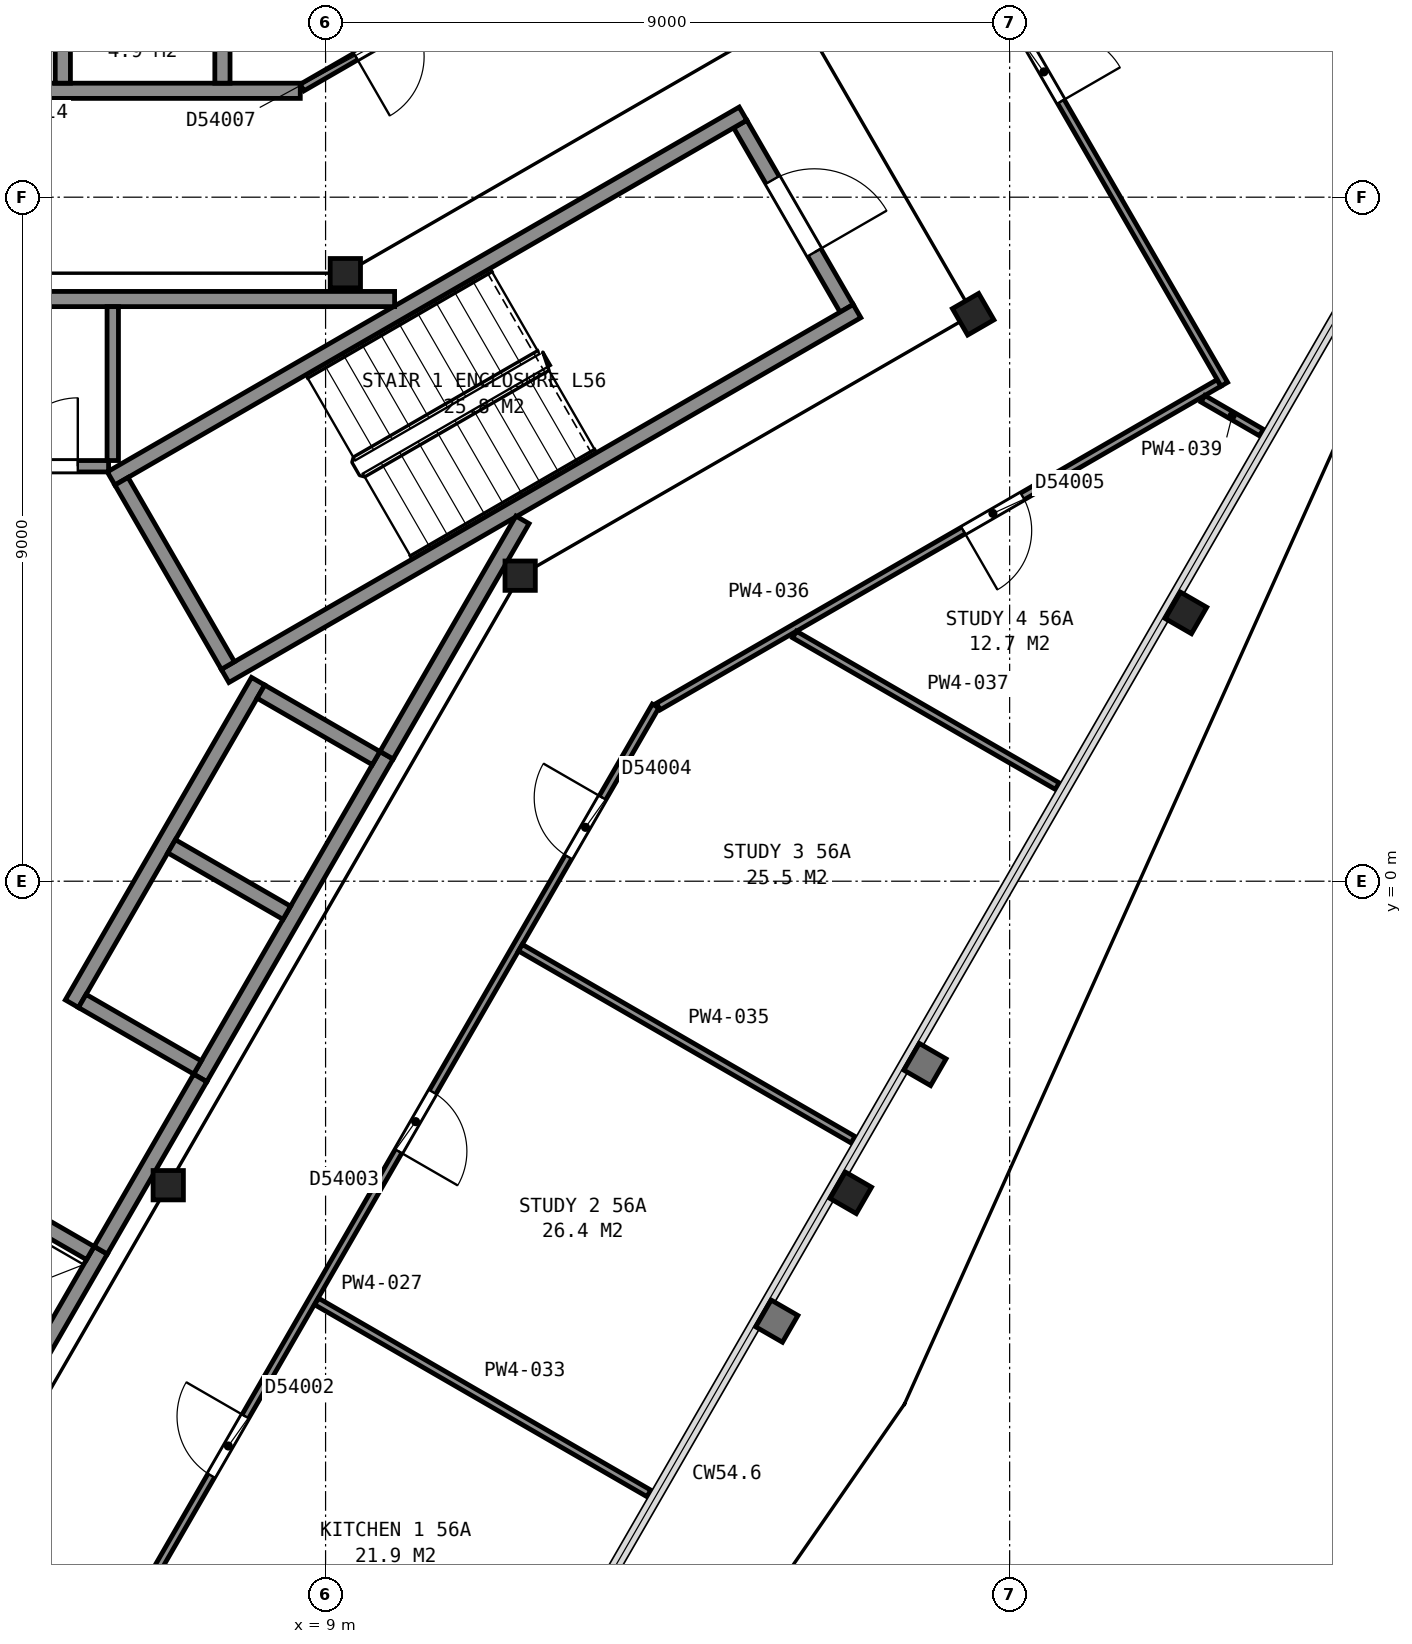
"""IFC4 building model, lengths in metres.
Left out: names, types, materials, properties, quantities, classifications, styles, units other than length and angle.
Written with IfcOpenShell. Run it as: python <this file> out.ifc"""

import sys

from ifc_helpers import new_model, si_unit, direction, frame, frame_2d, origin, origin_2d, place, context, subcontext, project, spatial, rectangle, i_section, extrude, element, fill, save


model = new_model("IFC4")
c1 = context("Model", 3, precision=1e-05, world=origin(), true_north=direction((0.0, 1.0)))
c2 = subcontext(c1, "Body", "Model", "MODEL_VIEW")
j1 = project(units=[si_unit("LENGTHUNIT", "METRE"), si_unit("PLANEANGLEUNIT", "RADIAN")], contexts=[c1])
p1 = place(None, origin())
s1 = spatial("IfcSite", under=j1, at=p1, CompositionType="ELEMENT")
p2 = place(p1, origin())
s2 = spatial("IfcBuilding", under=s1, at=p2, CompositionType="ELEMENT")
p3 = place(p2, frame((0.0, 0.0, 224.9)))
s3 = spatial("IfcBuildingStorey", under=s2, at=p3, CompositionType="ELEMENT", Elevation=224.9)
for number, where, z_axis, x_axis in (
    (1, (15.91, -4.1, 0.0), (0.0, 0.0, 1.0), (-0.5, -0.866, 0.0)),
    (2, (20.32, 3.53, 0.0), (0.0, 0.0, 1.0), (-0.5, -0.866, 0.0)),
):
    element("IfcColumn", number, at=place(p3, frame(where, z_axis=z_axis, x_axis=x_axis)), inside=s3, PredefinedType="COLUMN", context=c2, shape_type="SweptSolid", body=[
        extrude(i_section(OverallWidth=0.401, OverallDepth=0.399, WebThickness=0.025, FlangeThickness=0.04, FilletRadius=0.015, at=origin_2d()), origin(), (0.0, 0.0, 1.0), 3.7),
    ])
p4 = place(p3, frame((11.56, 4.02, 0.0), z_axis=(0.0, 0.0, 1.0), x_axis=(1.0, 0.0, 0.0)))
e3 = element("IfcColumn", 3, at=p4, inside=s3, PredefinedType="COLUMN", context=c2, shape_type="SweptSolid", body=[
    extrude(i_section(OverallWidth=0.399, OverallDepth=0.386, WebThickness=0.021, FlangeThickness=0.033, FilletRadius=0.015, at=origin_2d()), origin(), (0.0, 0.0, 1.0), 3.7),
])
p5 = place(p3, frame((17.52, 7.46, 0.0), z_axis=(0.0, 0.0, 1.0), x_axis=(0.5, -0.866025403784, 0.0)))
e4 = element("IfcColumn", 4, at=p5, inside=s3, PredefinedType="COLUMN", context=c2, shape_type="SweptSolid", body=[
    extrude(i_section(OverallWidth=0.401, OverallDepth=0.399, WebThickness=0.025, FlangeThickness=0.04, FilletRadius=0.015, at=origin_2d()), origin(), (0.0, 0.0, 1.0), 3.7),
])
for number, where, z_axis, x_axis in (
    (5, (9.26, 8.0, 0.0), (0.0, 0.0, 1.0), (1.0, 0.0, 0.0)),
    (6, (6.93, -4.0, 0.0), (0.0, 0.0, 1.0), (1.0, 0.0, 0.0)),
):
    element("IfcColumn", number, at=place(p3, frame(where, z_axis=z_axis, x_axis=x_axis)), inside=s3, PredefinedType="COLUMN", context=c2, shape_type="SweptSolid", body=[
        extrude(i_section(OverallWidth=0.399, OverallDepth=0.386, WebThickness=0.021, FlangeThickness=0.033, FilletRadius=0.015, at=origin_2d()), origin(), (0.0, 0.0, 1.0), 3.7),
    ])
p6 = place(p3, frame((15.855, 7.538, 0.0), z_axis=(0.0, 0.0, 1.0), x_axis=(-0.500049511043, 0.865996816683, 0.0)))
e7 = element("IfcWall", 7, at=p6, inside=s3, PredefinedType="PARTITIONING", context=c2, shape_type="SweptSolid", body=[
    extrude(rectangle(XDim=2.8, YDim=0.2, at=frame_2d((1.4, 0.0))), origin(), (0.0, 0.0, 1.0), 3.45),
])
p7 = place(p6, frame((0.85, 0.0, 0.0)))
e8 = element("IfcOpeningElement", 8, at=p7, cuts=e7, PredefinedType="OPENING", context=c2, shape_type="SweptSolid", body=[
    extrude(rectangle(XDim=1.1, YDim=2.1, at=frame_2d((0.55, 1.05))), frame((0.0, 0.11, 0.0), z_axis=(0.0, -1.0, 0.0), x_axis=(1.0, 0.0, 0.0)), (0.0, 0.0, 1.0), 0.22),
])
for number, where, z_axis, x_axis in (
    (9, (6.178, 5.299, 0.0), (0.0, 0.0, 1.0), (0.866, 0.5, 0.0)),
    (10, (7.678, 2.701, 0.0), (0.0, 0.0, 1.0), (0.866, 0.5, 0.0)),
):
    element("IfcWall", number, at=place(p3, frame(where, z_axis=z_axis, x_axis=x_axis)), inside=s3, PredefinedType="PARTITIONING", context=c2, shape_type="SweptSolid", body=[
        extrude(rectangle(XDim=9.6, YDim=0.2, at=frame_2d((4.8, 0.0))), origin(), (0.0, 0.0, 1.0), 3.45),
    ])
p8 = place(p3, frame((7.715, 2.838, 0.0), z_axis=(0.0, 0.0, 1.0), x_axis=(-0.500049511043, 0.865996816683, 0.0)))
e11 = element("IfcWall", 11, at=p8, inside=s3, PredefinedType="PARTITIONING", context=c2, shape_type="SweptSolid", body=[
    extrude(rectangle(XDim=2.8, YDim=0.2, at=frame_2d((1.4, 0.0))), origin(), (0.0, 0.0, 1.0), 3.45),
])
p9 = place(p3, frame((4.766, -7.065, 0.0), z_axis=(0.0, 0.0, 1.0), x_axis=(0.499948979701, 0.866054858364, 0.0)))
e12 = element("IfcWall", 12, at=p9, inside=s3, PredefinedType="PARTITIONING", context=c2, shape_type="SweptSolid", body=[
    extrude(rectangle(XDim=2.55, YDim=0.2, at=frame_2d((1.275, 0.0))), origin(), (0.0, 0.0, 1.0), 3.7),
])
p10 = place(p3, frame((7.351, -2.587, 0.0), z_axis=(0.0, 0.0, 1.0), x_axis=(0.500002801628, 0.866023786258, 0.0)))
e13 = element("IfcWall", 13, at=p10, inside=s3, PredefinedType="PARTITIONING", context=c2, shape_type="SweptSolid", body=[
    extrude(rectangle(XDim=4.9, YDim=0.2, at=frame_2d((2.45, 0.0))), origin(), (0.0, 0.0, 1.0), 3.7),
])
p11 = place(p3, frame((5.663, -1.612, 0.0), z_axis=(0.0, 0.0, 1.0), x_axis=(0.49998122708, 0.866036242063, 0.0)))
e14 = element("IfcWall", 14, at=p11, inside=s3, PredefinedType="PARTITIONING", context=c2, shape_type="SweptSolid", body=[
    extrude(rectangle(XDim=4.9, YDim=0.2, at=frame_2d((2.45, 0.0))), origin(), (0.0, 0.0, 1.0), 3.7),
])
p12 = place(p3, frame((9.665, 1.62, 0.0), z_axis=(0.0, 0.0, 1.0), x_axis=(-0.866002029911, 0.500040482552, 0.0)))
e15 = element("IfcWall", 15, at=p12, inside=s3, PredefinedType="PARTITIONING", context=c2, shape_type="SweptSolid", body=[
    extrude(rectangle(XDim=1.75, YDim=0.2, at=frame_2d((0.875, 0.0))), origin(), (0.0, 0.0, 1.0), 3.7),
])
for number, where, z_axis, x_axis in (
    (16, (8.49, -0.416, 0.0), (0.0, 0.0, 1.0), (-0.866, 0.5, 0.0)),
    (17, (7.315, -2.451, 0.0), (0.0, 0.0, 1.0), (-0.866, 0.5, 0.0)),
):
    element("IfcWall", number, at=place(p3, frame(where, z_axis=z_axis, x_axis=x_axis)), inside=s3, PredefinedType="PARTITIONING", context=c2, shape_type="SweptSolid", body=[
        extrude(rectangle(XDim=1.75, YDim=0.2, at=frame_2d((0.875, 0.0))), origin(), (0.0, 0.0, 1.0), 3.7),
    ])
p13 = place(p3, frame((5.905, -4.893, 0.0), z_axis=(0.0, 0.0, 1.0), x_axis=(-0.866002029911, 0.500040482552, 0.0)))
e18 = element("IfcWall", 18, at=p13, inside=s3, PredefinedType="PARTITIONING", context=c2, shape_type="SweptSolid", body=[
    extrude(rectangle(XDim=1.75, YDim=0.2, at=frame_2d((0.875, 0.0))), origin(), (0.0, 0.0, 1.0), 3.7),
])
p14 = place(p3, frame((-3.933, 7.66, 0.0), z_axis=(0.0, 0.0, 1.0), x_axis=(1.0, 0.0, 0.0)))
e19 = element("IfcWall", 19, at=p14, inside=s3, PredefinedType="PARTITIONING", context=c2, shape_type="SweptSolid", body=[
    extrude(rectangle(XDim=13.841, YDim=0.2, at=frame_2d((6.92, 0.0))), origin(), (0.0, 0.0, 1.0), 3.45),
])
p15 = place(p3, frame((0.925, 5.46, 0.0), z_axis=(0.0, 0.0, 1.0), x_axis=(1.0, 0.0, 0.0)))
e20 = element("IfcWall", 20, at=p15, inside=s3, PredefinedType="PARTITIONING", context=c2, shape_type="SweptSolid", body=[
    extrude(rectangle(XDim=5.22, YDim=0.15, at=frame_2d((2.61, 0.0))), origin(), (0.0, 0.0, 1.0), 3.45),
])
p16 = place(p15, frame((3.915, 0.0, 0.0)))
e21 = element("IfcOpeningElement", 21, at=p16, cuts=e20, PredefinedType="OPENING", context=c2, shape_type="SweptSolid", body=[
    extrude(rectangle(XDim=0.9, YDim=2.1, at=frame_2d((0.45, 1.05))), frame((0.0, 0.085, 0.0), z_axis=(0.0, -1.0, 0.0), x_axis=(1.0, 0.0, 0.0)), (0.0, 0.0, 1.0), 0.17),
])
p17 = place(p3, frame((6.042, -4.855, 0.0), z_axis=(0.0, 0.0, 1.0), x_axis=(0.500252727967, 0.865879442048, 0.0)))
e22 = element("IfcWall", 22, at=p17, inside=s3, PredefinedType="PARTITIONING", context=c2, shape_type="SweptSolid", body=[
    extrude(rectangle(XDim=2.617, YDim=0.2, at=frame_2d((1.309, 0.0))), origin(), (0.0, 0.0, 1.0), 3.45),
])
p18 = place(p3, frame((6.2, 5.535, 0.0), z_axis=(0.0, 0.0, 1.0), x_axis=(0.0, 1.0, 0.0)))
e23 = element("IfcWall", 23, at=p18, inside=s3, PredefinedType="PARTITIONING", context=c2, shape_type="SweptSolid", body=[
    extrude(rectangle(XDim=2.025, YDim=0.15, at=frame_2d((1.013, 0.0))), origin(), (0.0, 0.0, 1.0), 3.45),
])
p19 = place(p3, frame((9.803, 1.658, 0.0), z_axis=(0.0, 0.0, 1.0), x_axis=(0.499943114462, 0.866058244174, 0.0)))
e24 = element("IfcWall", 24, at=p19, inside=s3, PredefinedType="PARTITIONING", context=c2, shape_type="SweptSolid", body=[
    extrude(rectangle(XDim=3.576, YDim=0.2, at=frame_2d((1.788, 0.0))), origin(), (0.0, 0.0, 1.0), 3.45),
])
p20 = place(p3, frame((-8.667, 10.4, 0.0), z_axis=(0.0, 0.0, 1.0), x_axis=(1.0, 0.0, 0.0)))
e25 = element("IfcWall", 25, at=p20, inside=s3, PredefinedType="PARTITIONING", context=c2, shape_type="SweptSolid", body=[
    extrude(rectangle(XDim=17.334, YDim=0.2, at=frame_2d((8.667, 0.0))), origin(), (0.0, 0.0, 1.0), 2.713),
])
p21 = place(p20, frame((9.252, 0.0, 0.0)))
e26 = element("IfcOpeningElement", 26, at=p21, cuts=e25, PredefinedType="OPENING", context=c2, shape_type="SweptSolid", body=[
    extrude(rectangle(XDim=0.9, YDim=2.1, at=frame_2d((0.45, 1.05))), frame((0.0, 0.11, 0.0), z_axis=(0.0, -1.0, 0.0), x_axis=(1.0, 0.0, 0.0)), (0.0, 0.0, 1.0), 0.22),
])
p22 = place(p20, frame((4.851, 0.0, 0.0)))
e27 = element("IfcOpeningElement", 27, at=p22, cuts=e25, PredefinedType="OPENING", context=c2, shape_type="SweptSolid", body=[
    extrude(rectangle(XDim=0.9, YDim=2.1, at=frame_2d((0.45, 1.05))), frame((0.0, 0.11, 0.0), z_axis=(0.0, -1.0, 0.0), x_axis=(1.0, 0.0, 0.0)), (0.0, 0.0, 1.0), 0.22),
])
p23 = place(p3, frame((13.342, 2.306, 0.0), z_axis=(0.0, 0.0, 1.0), x_axis=(-0.49997440863, -0.866040178465, 0.0)))
e28 = element("IfcWall", 28, at=p23, inside=s3, PredefinedType="PARTITIONING", context=c2, shape_type="SweptSolid", body=[
    extrude(rectangle(XDim=17.335, YDim=0.1, at=frame_2d((8.667, 0.0))), origin(), (0.0, 0.0, 1.0), 2.713),
])
p24 = place(p23, frame((14.935, 0.0, 0.0)))
e29 = element("IfcOpeningElement", 29, at=p24, cuts=e28, PredefinedType="OPENING", context=c2, shape_type="SweptSolid", body=[
    extrude(rectangle(XDim=0.9, YDim=2.1, at=frame_2d((0.45, 1.05))), frame((0.0, 0.06, 0.0), z_axis=(0.0, -1.0, 0.0), x_axis=(1.0, 0.0, 0.0)), (0.0, 0.0, 1.0), 0.12),
])
p25 = place(p23, frame((10.794, 0.0, 0.0)))
e30 = element("IfcOpeningElement", 30, at=p25, cuts=e28, PredefinedType="OPENING", context=c2, shape_type="SweptSolid", body=[
    extrude(rectangle(XDim=0.9, YDim=2.1, at=frame_2d((0.45, 1.05))), frame((0.0, 0.06, 0.0), z_axis=(0.0, -1.0, 0.0), x_axis=(1.0, 0.0, 0.0)), (0.0, 0.0, 1.0), 0.12),
])
p26 = place(p23, frame((5.866, 0.0, 0.0)))
e31 = element("IfcOpeningElement", 31, at=p26, cuts=e28, PredefinedType="OPENING", context=c2, shape_type="SweptSolid", body=[
    extrude(rectangle(XDim=0.9, YDim=2.1, at=frame_2d((0.45, 1.05))), frame((0.0, 0.06, 0.0), z_axis=(0.0, -1.0, 0.0), x_axis=(1.0, 0.0, 0.0)), (0.0, 0.0, 1.0), 0.12),
])
p27 = place(p23, frame((1.395, 0.0, 0.0)))
e32 = element("IfcOpeningElement", 32, at=p27, cuts=e28, PredefinedType="OPENING", context=c2, shape_type="SweptSolid", body=[
    extrude(rectangle(XDim=0.9, YDim=2.1, at=frame_2d((0.45, 1.05))), frame((0.0, 0.06, 0.0), z_axis=(0.0, -1.0, 0.0), x_axis=(1.0, 0.0, 0.0)), (0.0, 0.0, 1.0), 0.12),
])
p28 = place(p3, frame((5.543, 10.5, 0.0), z_axis=(0.0, 0.0, 1.0), x_axis=(0.0, 1.0, 0.0)))
e33 = element("IfcWall", 33, at=p28, inside=s3, PredefinedType="PARTITIONING", context=c2, shape_type="SweptSolid", body=[
    extrude(rectangle(XDim=5.006, YDim=0.2, at=frame_2d((2.503, 0.0))), origin(), (0.0, 0.0, 1.0), 2.713),
])
p29 = place(p3, frame((7.643, 10.5, 0.0), z_axis=(0.0, 0.0, 1.0), x_axis=(0.0, 1.0, 0.0)))
e34 = element("IfcWall", 34, at=p29, inside=s3, PredefinedType="PARTITIONING", context=c2, shape_type="SweptSolid", body=[
    extrude(rectangle(XDim=2.8, YDim=0.2, at=frame_2d((1.4, 0.0))), origin(), (0.0, 0.0, 1.0), 2.713),
])
p30 = place(p3, frame((8.691, 10.442, 0.0), z_axis=(0.0, 0.0, 1.0), x_axis=(0.866070360466, 0.499922124658, 0.0)))
e35 = element("IfcWall", 35, at=p30, inside=s3, PredefinedType="PARTITIONING", context=c2, shape_type="SweptSolid", body=[
    extrude(rectangle(XDim=8.503, YDim=0.1, at=frame_2d((4.251, 0.0))), origin(), (0.0, 0.0, 1.0), 2.713),
])
p31 = place(p30, frame((0.815, 0.0, 0.0)))
e36 = element("IfcOpeningElement", 36, at=p31, cuts=e35, PredefinedType="OPENING", context=c2, shape_type="SweptSolid", body=[
    extrude(rectangle(XDim=0.9, YDim=2.1, at=frame_2d((0.45, 1.05))), frame((0.0, 0.06, 0.0), z_axis=(0.0, -1.0, 0.0), x_axis=(1.0, 0.0, 0.0)), (0.0, 0.0, 1.0), 0.12),
])
p32 = place(p3, frame((8.882, -5.53, 0.0), z_axis=(0.0, 0.0, 1.0), x_axis=(0.865915800513, -0.500189790402, 0.0)))
e37 = element("IfcWall", 37, at=p32, inside=s3, PredefinedType="PARTITIONING", context=c2, shape_type="SweptSolid", body=[
    extrude(rectangle(XDim=5.049, YDim=0.1, at=frame_2d((2.525, 0.0))), origin(), (0.0, 0.0, 1.0), 2.713),
])
p33 = place(p3, frame((11.563, -0.875, 0.0), z_axis=(0.0, 0.0, 1.0), x_axis=(0.866052865344, -0.499952432166, 0.0)))
e38 = element("IfcWall", 38, at=p33, inside=s3, PredefinedType="PARTITIONING", context=c2, shape_type="SweptSolid", body=[
    extrude(rectangle(XDim=5.054, YDim=0.1, at=frame_2d((2.527, 0.0))), origin(), (0.0, 0.0, 1.0), 2.713),
])
p34 = place(p3, frame((20.756, 6.557, 0.0), z_axis=(0.0, 0.0, 1.0), x_axis=(-0.866069146081, -0.499924228466, 0.0)))
e39 = element("IfcWall", 39, at=p34, inside=s3, PredefinedType="PARTITIONING", context=c2, shape_type="SweptSolid", body=[
    extrude(rectangle(XDim=8.519, YDim=0.1, at=frame_2d((4.259, 0.0))), origin(), (0.0, 0.0, 1.0), 2.713),
])
p35 = place(p34, frame((2.986, 0.0, 0.0)))
e40 = element("IfcOpeningElement", 40, at=p35, cuts=e39, PredefinedType="OPENING", context=c2, shape_type="SweptSolid", body=[
    extrude(rectangle(XDim=0.9, YDim=2.1, at=frame_2d((0.45, 1.05))), frame((0.0, 0.06, 0.0), z_axis=(0.0, -1.0, 0.0), x_axis=(1.0, 0.0, 0.0)), (0.0, 0.0, 1.0), 0.12),
])
p36 = place(p3, frame((15.17, 3.246, 0.0), z_axis=(0.0, 0.0, 1.0), x_axis=(0.866149939141, -0.499784236372, 0.0)))
e41 = element("IfcWall", 41, at=p36, inside=s3, PredefinedType="PARTITIONING", context=c2, shape_type="SweptSolid", body=[
    extrude(rectangle(XDim=3.991, YDim=0.1, at=frame_2d((1.996, 0.0))), origin(), (0.0, 0.0, 1.0), 2.713),
])
p37 = place(p3, frame((16.073, 14.761, 0.0), z_axis=(0.0, 0.0, 1.0), x_axis=(0.500297300687, -0.865853689098, 0.0)))
e42 = element("IfcWall", 42, at=p37, inside=s3, PredefinedType="PARTITIONING", context=c2, shape_type="SweptSolid", body=[
    extrude(rectangle(XDim=9.496, YDim=0.1, at=frame_2d((4.748, 0.0))), origin(), (0.0, 0.0, 1.0), 2.713),
])
p38 = place(p37, frame((4.3, 0.0, 0.0)))
e43 = element("IfcOpeningElement", 43, at=p38, cuts=e42, PredefinedType="OPENING", context=c2, shape_type="SweptSolid", body=[
    extrude(rectangle(XDim=0.9, YDim=2.1, at=frame_2d((0.45, 1.05))), frame((0.0, 0.06, 0.0), z_axis=(0.0, -1.0, 0.0), x_axis=(1.0, 0.0, 0.0)), (0.0, 0.0, 1.0), 0.12),
])
p39 = place(p3, frame((20.543, 6.348, 0.0), z_axis=(0.0, 0.0, 1.0), x_axis=(0.865952303503, -0.500126592033, 0.0)))
e44 = element("IfcWall", 44, at=p39, inside=s3, PredefinedType="PARTITIONING", context=c2, shape_type="SweptSolid", body=[
    extrude(rectangle(XDim=0.889, YDim=0.1, at=frame_2d((0.444, 0.0))), origin(), (0.0, 0.0, 1.0), 2.713),
])
p40 = place(p7, origin())
e45 = element("IfcDoor", 45, at=p40, inside=s3, OperationType="SINGLE_SWING_LEFT", PredefinedType="DOOR", context=c2, shape_type="SweptSolid", body=[
    extrude(rectangle(XDim=1.1, YDim=2.1, at=frame_2d((0.55, 1.05))), frame((0.0, 0.025, 0.0), z_axis=(0.0, -1.0, 0.0), x_axis=(1.0, 0.0, 0.0)), (0.0, 0.0, 1.0), 0.05),
])
fill(e8, e45)
p41 = place(p16, origin())
e46 = element("IfcDoor", 46, at=p41, inside=s3, OperationType="SINGLE_SWING_RIGHT", PredefinedType="DOOR", context=c2, shape_type="SweptSolid", body=[
    extrude(rectangle(XDim=0.9, YDim=2.1, at=frame_2d((0.45, 1.05))), frame((0.0, 0.025, 0.0), z_axis=(0.0, -1.0, 0.0), x_axis=(1.0, 0.0, 0.0)), (0.0, 0.0, 1.0), 0.05),
])
fill(e21, e46)
p42 = place(p25, origin())
e47 = element("IfcDoor", 47, at=p42, inside=s3, OperationType="SINGLE_SWING_LEFT", PredefinedType="DOOR", context=c2, shape_type="SweptSolid", body=[
    extrude(rectangle(XDim=0.9, YDim=2.1, at=frame_2d((0.45, 1.05))), frame((0.0, 0.025, 0.0), z_axis=(0.0, -1.0, 0.0), x_axis=(1.0, 0.0, 0.0)), (0.0, 0.0, 1.0), 0.05),
])
fill(e30, e47)
p43 = place(p26, origin())
e48 = element("IfcDoor", 48, at=p43, inside=s3, OperationType="SINGLE_SWING_RIGHT", PredefinedType="DOOR", context=c2, shape_type="SweptSolid", body=[
    extrude(rectangle(XDim=0.9, YDim=2.1, at=frame_2d((0.45, 1.05))), frame((0.0, 0.025, 0.0), z_axis=(0.0, -1.0, 0.0), x_axis=(1.0, 0.0, 0.0)), (0.0, 0.0, 1.0), 0.05),
])
fill(e31, e48)
p44 = place(p27, origin())
e49 = element("IfcDoor", 49, at=p44, inside=s3, OperationType="SINGLE_SWING_LEFT", PredefinedType="DOOR", context=c2, shape_type="SweptSolid", body=[
    extrude(rectangle(XDim=0.9, YDim=2.1, at=frame_2d((0.45, 1.05))), frame((0.0, 0.025, 0.0), z_axis=(0.0, -1.0, 0.0), x_axis=(1.0, 0.0, 0.0)), (0.0, 0.0, 1.0), 0.05),
])
fill(e32, e49)
p45 = place(p31, origin())
e50 = element("IfcDoor", 50, at=p45, inside=s3, OperationType="SINGLE_SWING_LEFT", PredefinedType="DOOR", context=c2, shape_type="SweptSolid", body=[
    extrude(rectangle(XDim=0.9, YDim=2.1, at=frame_2d((0.45, 1.05))), frame((0.0, 0.025, 0.0), z_axis=(0.0, -1.0, 0.0), x_axis=(1.0, 0.0, 0.0)), (0.0, 0.0, 1.0), 0.05),
])
fill(e36, e50)
p46 = place(p35, origin())
e51 = element("IfcDoor", 51, at=p46, inside=s3, OperationType="SINGLE_SWING_RIGHT", PredefinedType="DOOR", context=c2, shape_type="SweptSolid", body=[
    extrude(rectangle(XDim=0.9, YDim=2.1, at=frame_2d((0.45, 1.05))), frame((0.0, 0.025, 0.0), z_axis=(0.0, -1.0, 0.0), x_axis=(1.0, 0.0, 0.0)), (0.0, 0.0, 1.0), 0.05),
])
fill(e40, e51)
p47 = place(p38, origin())
e52 = element("IfcDoor", 52, at=p47, inside=s3, OperationType="SINGLE_SWING_RIGHT", PredefinedType="DOOR", context=c2, shape_type="SweptSolid", body=[
    extrude(rectangle(XDim=0.9, YDim=2.1, at=frame_2d((0.45, 1.05))), frame((0.0, 0.025, 0.0), z_axis=(0.0, -1.0, 0.0), x_axis=(1.0, 0.0, 0.0)), (0.0, 0.0, 1.0), 0.05),
])
fill(e43, e52)
save(model, sys.argv[1])
